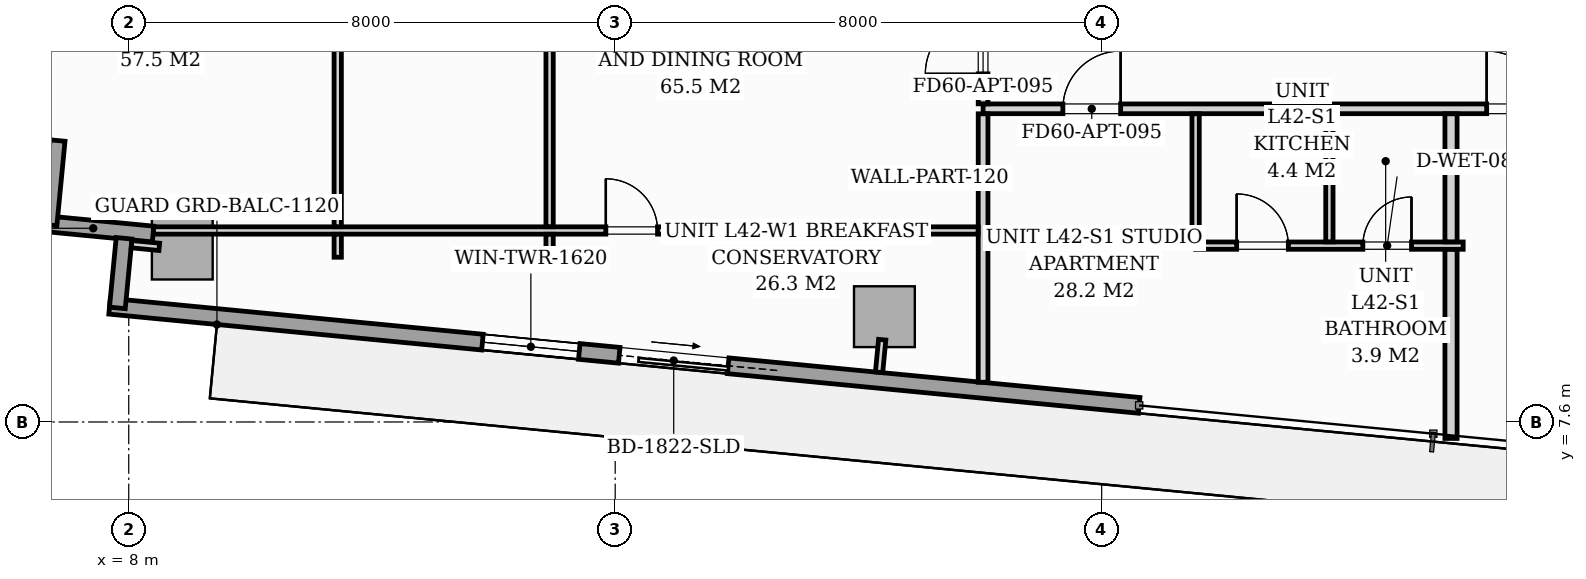
"""IFC4 building model, lengths in metres.
Left out: names, types, materials, properties, quantities, classifications, styles, units other than length and angle.
Written with IfcOpenShell. Run it as: python <this file> out.ifc"""

import sys

from ifc_helpers import new_model, si_unit, direction, frame, frame_2d, origin, origin_2d, place, context, subcontext, project, spatial, rectangle, extrude, source, transform, mapped, element, fill, save


model = new_model("IFC4")
c1 = context("Model", 3, precision=1e-05, world=origin(), true_north=direction((0.0, 1.0)))
c2 = subcontext(c1, "Body", "Model", "MODEL_VIEW")
j1 = project(units=[si_unit("LENGTHUNIT", "METRE"), si_unit("PLANEANGLEUNIT", "RADIAN")], contexts=[c1])
p1 = place(None, origin())
s1 = spatial("IfcSite", under=j1, at=p1, CompositionType="ELEMENT")
p2 = place(p1, origin())
s2 = spatial("IfcBuilding", under=s1, at=p2, CompositionType="ELEMENT")
p3 = place(p2, frame((0.0, 0.0, 147.0)))
s3 = spatial("IfcBuildingStorey", under=s2, at=p3, CompositionType="ELEMENT", Elevation=147.0)
m1 = source(origin(), c2, "Body", "SweptSolid", [
    extrude(rectangle(XDim=1.0, YDim=1.0, at=origin_2d()), origin(), (0.0, 0.0, 1.0), 3.196),
])
for number, where, z_axis, x_axis in (
    (1, (8.881, 10.443, 0.002), (0.0, 0.0, 1.0), (0.995, -0.096, 0.0)),
    (2, (20.427, 9.332, 0.002), (0.0, 0.0, 1.0), (0.995, -0.096, 0.0)),
):
    element("IfcColumn", number, at=place(p3, frame(where, z_axis=z_axis, x_axis=x_axis)), inside=s3, PredefinedType="COLUMN", context=c2, shape_type="MappedRepresentation", body=[
        mapped(m1, transform((0.0, 0.0, 0.0), scale=1.0)),
    ])
p4 = place(p3, frame((8.4, 10.69, 0.0), z_axis=(0.0, 0.0, 1.0), x_axis=(-0.995391147587, 0.095898192396, 0.0)))
e3 = element("IfcWall", 3, at=p4, inside=s3, PredefinedType="STANDARD", context=c2, shape_type="SweptSolid", body=[
    extrude(rectangle(XDim=1.978, YDim=0.26, at=frame_2d((0.989, 0.0))), origin(), (0.0, 0.0, 1.0), 2.94),
])
p5 = place(p3, frame((6.688, 10.84, 0.0), z_axis=(0.0, 0.0, 1.0), x_axis=(0.09589913835, 0.995391056452, 0.0)))
e4 = element("IfcWall", 4, at=p5, inside=s3, PredefinedType="STANDARD", context=c2, shape_type="SweptSolid", body=[
    extrude(rectangle(XDim=1.395, YDim=0.26, at=frame_2d((0.698, 0.0))), origin(), (0.0, 0.0, 1.0), 2.94),
])
p6 = place(p3, frame((24.617, 7.873, 0.0), z_axis=(0.0, 0.0, 1.0), x_axis=(-0.995395976631, 0.095848055311, 0.0)))
e5 = element("IfcWall", 5, at=p6, inside=s3, PredefinedType="STANDARD", context=c2, shape_type="SweptSolid", body=[
    extrude(rectangle(XDim=17.01, YDim=0.26, at=frame_2d((8.505, 0.0))), origin(), (0.0, 0.0, 1.0), 2.94),
])
p7 = place(p6, frame((6.79, 0.0, 0.0)))
e6 = element("IfcOpeningElement", 6, at=p7, cuts=e5, PredefinedType="OPENING", context=c2, shape_type="SweptSolid", body=[
    extrude(rectangle(XDim=1.8, YDim=2.06, at=frame_2d((0.9, 1.03))), frame((0.0, 0.14, 0.0), z_axis=(0.0, -1.0, 0.0), x_axis=(1.0, 0.0, 0.0)), (0.0, 0.0, 1.0), 0.28),
])
p8 = place(p6, frame((9.25, 0.0, 0.65)))
e7 = element("IfcOpeningElement", 7, at=p8, cuts=e5, PredefinedType="OPENING", context=c2, shape_type="SweptSolid", body=[
    extrude(rectangle(XDim=1.6, YDim=1.5, at=frame_2d((0.8, 0.75))), frame((0.0, 0.14, 0.0), z_axis=(0.0, -1.0, 0.0), x_axis=(1.0, 0.0, 0.0)), (0.0, 0.0, 1.0), 0.28),
])
p9 = place(p3, frame((7.813, 9.476, 0.0), z_axis=(0.0, 0.0, 1.0), x_axis=(0.09576095695, 0.995404359607, 0.0)))
e8 = element("IfcWall", 8, at=p9, inside=s3, PredefinedType="STANDARD", context=c2, shape_type="SweptSolid", body=[
    extrude(rectangle(XDim=1.15, YDim=0.26, at=frame_2d((0.575, 0.0))), origin(), (0.0, 0.0, 1.0), 2.94),
])
p10 = place(p3, frame((22.05, 12.75, 0.0), z_axis=(0.0, 0.0, 1.0), x_axis=(1.0, 0.0, 0.0)))
e9 = element("IfcWall", 9, at=p10, inside=s3, PredefinedType="PARTITIONING", context=c2, shape_type="SweptSolid", body=[
    extrude(rectangle(XDim=25.65, YDim=0.16, at=frame_2d((12.825, 0.0))), origin(), (0.0, 0.0, 1.0), 2.94),
])
p11 = place(p10, frame((1.312, 0.0, 0.0)))
e10 = element("IfcOpeningElement", 10, at=p11, cuts=e9, PredefinedType="OPENING", context=c2, shape_type="SweptSolid", body=[
    extrude(rectangle(XDim=0.95, YDim=2.06, at=frame_2d((0.475, 1.03))), frame((0.0, 0.09, 0.0), z_axis=(0.0, -1.0, 0.0), x_axis=(1.0, 0.0, 0.0)), (0.0, 0.0, 1.0), 0.18),
])
p12 = place(p10, frame((8.281, 0.0, 0.0)))
e11 = element("IfcOpeningElement", 11, at=p12, cuts=e9, PredefinedType="OPENING", context=c2, shape_type="SweptSolid", body=[
    extrude(rectangle(XDim=0.95, YDim=2.06, at=frame_2d((0.475, 1.03))), frame((0.0, 0.09, 0.0), z_axis=(0.0, -1.0, 0.0), x_axis=(1.0, 0.0, 0.0)), (0.0, 0.0, 1.0), 0.18),
])
p13 = place(p10, frame((17.268, 0.0, 0.0)))
e12 = element("IfcOpeningElement", 12, at=p13, cuts=e9, PredefinedType="OPENING", context=c2, shape_type="SweptSolid", body=[
    extrude(rectangle(XDim=0.95, YDim=2.06, at=frame_2d((0.475, 1.03))), frame((0.0, 0.09, 0.0), z_axis=(0.0, -1.0, 0.0), x_axis=(1.0, 0.0, 0.0)), (0.0, 0.0, 1.0), 0.18),
])
p14 = place(p3, frame((22.05, 8.253, 0.0), z_axis=(0.0, 0.0, 1.0), x_axis=(0.0, 1.0, 0.0)))
e13 = element("IfcWall", 13, at=p14, inside=s3, PredefinedType="PARTITIONING", context=c2, shape_type="SweptSolid", body=[
    extrude(rectangle(XDim=4.415, YDim=0.16, at=frame_2d((2.208, 0.0))), origin(), (0.0, 0.0, 1.0), 2.94),
])
p15 = place(p3, frame((22.05, 12.832, 0.0), z_axis=(0.0, 0.0, 1.0), x_axis=(0.0, 1.0, 0.0)))
e14 = element("IfcWall", 14, at=p15, inside=s3, PredefinedType="PARTITIONING", context=c2, shape_type="SweptSolid", body=[
    extrude(rectangle(XDim=14.585, YDim=0.16, at=frame_2d((7.292, 0.0))), origin(), (0.0, 0.0, 1.0), 2.94),
])
p16 = place(p15, frame((0.493, 0.0, 0.0)))
e15 = element("IfcOpeningElement", 15, at=p16, cuts=e14, PredefinedType="OPENING", context=c2, shape_type="SweptSolid", body=[
    extrude(rectangle(XDim=0.95, YDim=2.06, at=frame_2d((0.475, 1.03))), frame((0.0, 0.09, 0.0), z_axis=(0.0, -1.0, 0.0), x_axis=(1.0, 0.0, 0.0)), (0.0, 0.0, 1.0), 0.18),
])
p17 = place(p3, frame((25.545, 10.5, 0.0), z_axis=(0.0, 0.0, 1.0), x_axis=(1.0, 0.0, 0.0)))
e16 = element("IfcWall", 16, at=p17, inside=s3, PredefinedType="PARTITIONING", context=c2, shape_type="SweptSolid", body=[
    extrude(rectangle(XDim=4.4, YDim=0.12, at=frame_2d((2.2, 0.0))), origin(), (0.0, 0.0, 1.0), 2.94),
])
p18 = place(p17, frame((0.675, 0.0, 0.0)))
e17 = element("IfcOpeningElement", 17, at=p18, cuts=e16, PredefinedType="OPENING", context=c2, shape_type="SweptSolid", body=[
    extrude(rectangle(XDim=0.85, YDim=2.05, at=frame_2d((0.425, 1.025))), frame((0.0, 0.07, 0.0), z_axis=(0.0, -1.0, 0.0), x_axis=(1.0, 0.0, 0.0)), (0.0, 0.0, 1.0), 0.14),
])
p19 = place(p17, frame((2.75, 0.0, 0.0)))
e18 = element("IfcOpeningElement", 18, at=p19, cuts=e16, PredefinedType="OPENING", context=c2, shape_type="SweptSolid", body=[
    extrude(rectangle(XDim=0.8, YDim=2.02, at=frame_2d((0.4, 1.01))), frame((0.0, 0.07, 0.0), z_axis=(0.0, -1.0, 0.0), x_axis=(1.0, 0.0, 0.0)), (0.0, 0.0, 1.0), 0.14),
])
for number, where, z_axis, x_axis in (
    (19, (25.545, 10.562, 0.0), (0.0, 0.0, 1.0), (0.0, 1.0, 0.0)),
    (20, (27.745, 10.562, 0.0), (0.0, 0.0, 1.0), (0.0, 1.0, 0.0)),
):
    element("IfcWall", number, at=place(p3, frame(where, z_axis=z_axis, x_axis=x_axis)), inside=s3, PredefinedType="PARTITIONING", context=c2, shape_type="SweptSolid", body=[
        extrude(rectangle(XDim=2.106, YDim=0.12, at=frame_2d((1.053, 0.0))), origin(), (0.0, 0.0, 1.0), 2.94),
    ])
p20 = place(p3, frame((29.745, 7.329, 0.0), z_axis=(0.0, 0.0, 1.0), x_axis=(0.0, 1.0, 0.0)))
e21 = element("IfcWall", 21, at=p20, inside=s3, PredefinedType="PARTITIONING", context=c2, shape_type="SweptSolid", body=[
    extrude(rectangle(XDim=3.109, YDim=0.2, at=frame_2d((1.554, 0.0))), origin(), (0.0, 0.0, 1.0), 2.94),
])
p21 = place(p3, frame((29.745, 10.562, 0.0), z_axis=(0.0, 0.0, 1.0), x_axis=(0.0, 1.0, 0.0)))
e22 = element("IfcWall", 22, at=p21, inside=s3, PredefinedType="PARTITIONING", context=c2, shape_type="SweptSolid", body=[
    extrude(rectangle(XDim=2.106, YDim=0.2, at=frame_2d((1.053, 0.0))), origin(), (0.0, 0.0, 1.0), 2.94),
])
p22 = place(p3, frame((8.406, 10.749, 0.0), z_axis=(0.0, 0.0, 1.0), x_axis=(1.0, 0.0, 0.0)))
e23 = element("IfcWall", 23, at=p22, inside=s3, PredefinedType="PARTITIONING", context=c2, shape_type="SweptSolid", body=[
    extrude(rectangle(XDim=13.562, YDim=0.12, at=frame_2d((6.781, 0.0))), origin(), (0.0, 0.0, 1.0), 2.94),
])
p23 = place(p22, frame((7.44, 0.0, 0.0)))
e24 = element("IfcOpeningElement", 24, at=p23, cuts=e23, PredefinedType="OPENING", context=c2, shape_type="SweptSolid", body=[
    extrude(rectangle(XDim=0.85, YDim=2.05, at=frame_2d((0.425, 1.025))), frame((0.0, 0.07, 0.0), z_axis=(0.0, -1.0, 0.0), x_axis=(1.0, 0.0, 0.0)), (0.0, 0.0, 1.0), 0.14),
])
p24 = place(p3, frame((11.437, 10.309, 0.0), z_axis=(0.0, 0.0, 1.0), x_axis=(0.0, 1.0, 0.0)))
e25 = element("IfcWall", 25, at=p24, inside=s3, PredefinedType="PARTITIONING", context=c2, shape_type="SweptSolid", body=[
    extrude(rectangle(XDim=0.378, YDim=0.12, at=frame_2d((0.189, 0.0))), origin(), (0.0, 0.0, 1.0), 2.94),
])
p25 = place(p3, frame((11.437, 10.811, 0.0), z_axis=(0.0, 0.0, 1.0), x_axis=(0.0, 1.0, 0.0)))
e26 = element("IfcWall", 26, at=p25, inside=s3, PredefinedType="PARTITIONING", context=c2, shape_type="SweptSolid", body=[
    extrude(rectangle(XDim=10.893, YDim=0.12, at=frame_2d((5.447, 0.0))), origin(), (0.0, 0.0, 1.0), 2.94),
])
p26 = place(p25, frame((5.021, 0.0, 0.0)))
e27 = element("IfcOpeningElement", 27, at=p26, cuts=e26, PredefinedType="OPENING", context=c2, shape_type="SweptSolid", body=[
    extrude(rectangle(XDim=0.85, YDim=2.05, at=frame_2d((0.425, 1.025))), frame((0.0, 0.07, 0.0), z_axis=(0.0, -1.0, 0.0), x_axis=(1.0, 0.0, 0.0)), (0.0, 0.0, 1.0), 0.14),
])
p27 = place(p3, frame((14.921, 10.309, 0.0), z_axis=(0.0, 0.0, 1.0), x_axis=(0.0, 1.0, 0.0)))
e28 = element("IfcWall", 28, at=p27, inside=s3, PredefinedType="PARTITIONING", context=c2, shape_type="SweptSolid", body=[
    extrude(rectangle(XDim=0.378, YDim=0.12, at=frame_2d((0.189, 0.0))), origin(), (0.0, 0.0, 1.0), 2.94),
])
p28 = place(p3, frame((14.921, 10.811, 0.0), z_axis=(0.0, 0.0, 1.0), x_axis=(0.0, 1.0, 0.0)))
e29 = element("IfcWall", 29, at=p28, inside=s3, PredefinedType="PARTITIONING", context=c2, shape_type="SweptSolid", body=[
    extrude(rectangle(XDim=10.893, YDim=0.12, at=frame_2d((5.447, 0.0))), origin(), (0.0, 0.0, 1.0), 2.94),
])
p29 = place(p28, frame((5.021, 0.0, 0.0)))
e30 = element("IfcOpeningElement", 30, at=p29, cuts=e29, PredefinedType="OPENING", context=c2, shape_type="SweptSolid", body=[
    extrude(rectangle(XDim=0.85, YDim=2.05, at=frame_2d((0.425, 1.025))), frame((0.0, 0.07, 0.0), z_axis=(0.0, -1.0, 0.0), x_axis=(1.0, 0.0, 0.0)), (0.0, 0.0, 1.0), 0.14),
])
p30 = place(p3, frame((8.502, 10.48, 0.0), z_axis=(0.0, 0.0, 1.0), x_axis=(-0.995384576284, 0.09596637586, 0.0)))
e31 = element("IfcWall", 31, at=p30, inside=s3, PredefinedType="PARTITIONING", context=c2, shape_type="SweptSolid", body=[
    extrude(rectangle(XDim=0.458, YDim=0.12, at=frame_2d((0.229, 0.0))), origin(), (0.0, 0.0, 1.0), 2.94),
])
p31 = place(p3, frame((20.391, 8.953, 0.0), z_axis=(0.0, 0.0, 1.0), x_axis=(-0.096222656154, -0.995359834654, 0.0)))
e32 = element("IfcWall", 32, at=p31, inside=s3, PredefinedType="PARTITIONING", context=c2, shape_type="SweptSolid", body=[
    extrude(rectangle(XDim=0.538, YDim=0.12, at=frame_2d((0.269, 0.0))), origin(), (0.0, 0.0, 1.0), 2.94),
])
m2 = source(origin(), c2, "Body", "SweptSolid", [
    extrude(rectangle(XDim=1.8, YDim=2.06, at=frame_2d((0.9, 1.03))), frame((0.0, 0.025, 0.0), z_axis=(0.0, -1.0, 0.0), x_axis=(1.0, 0.0, 0.0)), (0.0, 0.0, 1.0), 0.05),
])
p32 = place(p7, origin())
e33 = element("IfcDoor", 33, at=p32, inside=s3, OperationType="SLIDING_TO_LEFT", PredefinedType="DOOR", context=c2, shape_type="MappedRepresentation", body=[
    mapped(m2, transform((0.0, 0.0, 0.0), scale=1.0)),
])
fill(e6, e33)
m3 = source(origin(), c2, "Body", "SweptSolid", [
    extrude(rectangle(XDim=1.6, YDim=1.5, at=frame_2d((0.8, 0.75))), frame((0.0, 0.03, 0.0), z_axis=(0.0, -1.0, 0.0), x_axis=(1.0, 0.0, 0.0)), (0.0, 0.0, 1.0), 0.06),
])
p33 = place(p8, origin())
e34 = element("IfcWindow", 34, at=p33, inside=s3, PartitioningType="SINGLE_PANEL", PredefinedType="WINDOW", context=c2, shape_type="MappedRepresentation", body=[
    mapped(m3, transform((0.0, 0.0, 0.0), scale=1.0)),
])
fill(e7, e34)
m4 = source(origin(), c2, "Body", "SweptSolid", [
    extrude(rectangle(XDim=0.95, YDim=2.06, at=frame_2d((0.475, 1.03))), frame((0.0, 0.025, 0.0), z_axis=(0.0, -1.0, 0.0), x_axis=(1.0, 0.0, 0.0)), (0.0, 0.0, 1.0), 0.05),
])
p34 = place(p11, origin())
e35 = element("IfcDoor", 35, at=p34, inside=s3, OperationType="SINGLE_SWING_RIGHT", PredefinedType="DOOR", context=c2, shape_type="MappedRepresentation", body=[
    mapped(m4, transform((0.0, 0.0, 0.0), scale=1.0)),
])
fill(e10, e35)
m5 = source(origin(), c2, "Body", "SweptSolid", [
    extrude(rectangle(XDim=0.85, YDim=2.05, at=frame_2d((0.425, 1.025))), frame((0.0, 0.025, 0.0), z_axis=(0.0, -1.0, 0.0), x_axis=(1.0, 0.0, 0.0)), (0.0, 0.0, 1.0), 0.05),
])
p35 = place(p18, origin())
e36 = element("IfcDoor", 36, at=p35, inside=s3, OperationType="SINGLE_SWING_LEFT", PredefinedType="DOOR", context=c2, shape_type="MappedRepresentation", body=[
    mapped(m5, transform((0.0, 0.0, 0.0), scale=1.0)),
])
fill(e17, e36)
m6 = source(origin(), c2, "Body", "SweptSolid", [
    extrude(rectangle(XDim=0.8, YDim=2.02, at=frame_2d((0.4, 1.01))), frame((0.0, 0.025, 0.0), z_axis=(0.0, -1.0, 0.0), x_axis=(1.0, 0.0, 0.0)), (0.0, 0.0, 1.0), 0.05),
])
p36 = place(p19, origin())
e37 = element("IfcDoor", 37, at=p36, inside=s3, OperationType="SINGLE_SWING_RIGHT", PredefinedType="DOOR", context=c2, shape_type="MappedRepresentation", body=[
    mapped(m6, transform((0.0, 0.0, 0.0), scale=1.0)),
])
fill(e18, e37)
p37 = place(p12, origin())
e38 = element("IfcDoor", 38, at=p37, inside=s3, OperationType="SINGLE_SWING_LEFT", PredefinedType="DOOR", context=c2, shape_type="MappedRepresentation", body=[
    mapped(m4, transform((0.0, 0.0, 0.0), scale=1.0)),
])
fill(e11, e38)
p38 = place(p16, origin())
e39 = element("IfcDoor", 39, at=p38, inside=s3, OperationType="SINGLE_SWING_LEFT", PredefinedType="DOOR", context=c2, shape_type="MappedRepresentation", body=[
    mapped(m4, transform((0.0, 0.0, 0.0), scale=1.0)),
])
fill(e15, e39)
p39 = place(p23, origin())
e40 = element("IfcDoor", 40, at=p39, inside=s3, OperationType="SINGLE_SWING_LEFT", PredefinedType="DOOR", context=c2, shape_type="MappedRepresentation", body=[
    mapped(m5, transform((0.0, 0.0, 0.0), scale=1.0)),
])
fill(e24, e40)
save(model, sys.argv[1])
